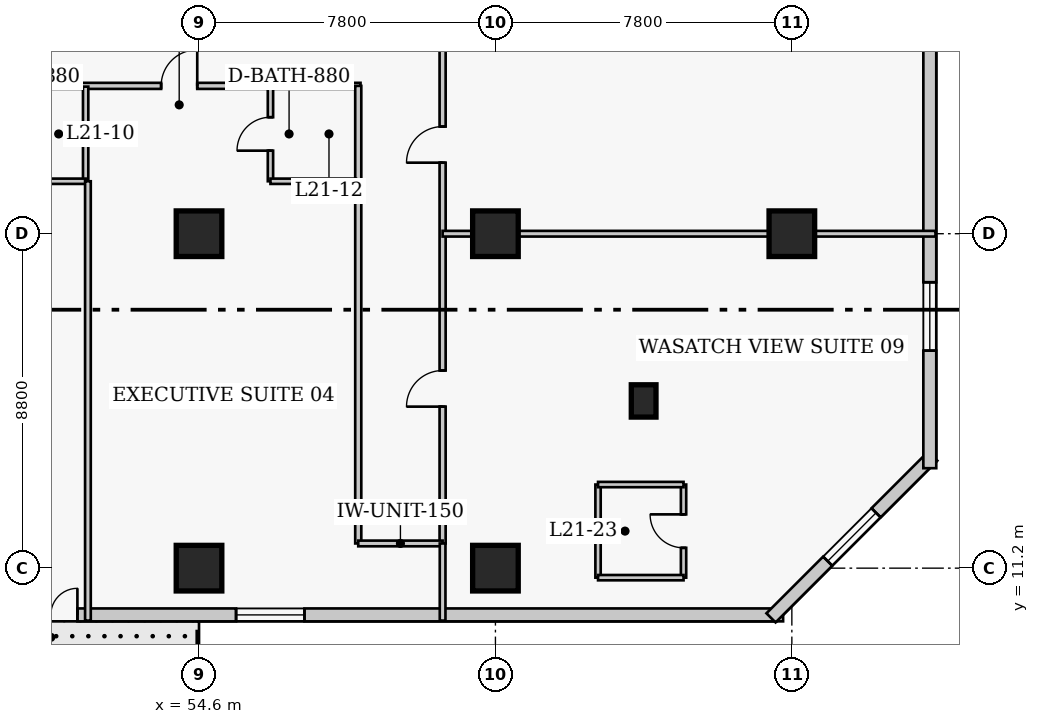
"""IFC4 building model, lengths in metres.
Left out: names, types, materials, properties, quantities, classifications, styles, units other than length and angle.
Written with IfcOpenShell. Run it as: python <this file> out.ifc"""

import sys

from ifc_helpers import new_model, si_unit, direction, frame, frame_2d, origin, origin_2d, place, context, subcontext, project, spatial, rectangle, extrude, element, fill, save


model = new_model("IFC4")
c1 = context("Model", 3, precision=1e-05, world=origin(), true_north=direction((0.0, 1.0)))
c2 = subcontext(c1, "Body", "Model", "MODEL_VIEW")
j1 = project(units=[si_unit("LENGTHUNIT", "METRE"), si_unit("PLANEANGLEUNIT", "RADIAN")], contexts=[c1])
p1 = place(None, origin())
s1 = spatial("IfcSite", under=j1, at=p1, CompositionType="ELEMENT")
p2 = place(p1, origin())
s2 = spatial("IfcBuilding", under=s1, at=p2, CompositionType="ELEMENT")
p3 = place(p2, frame((0.0, 0.0, 88.0)))
s3 = spatial("IfcBuildingStorey", under=s2, at=p3, CompositionType="ELEMENT", Elevation=88.0)
for number, where, z_axis, x_axis in (
    (1, (54.6, 11.2, 0.0), (0.0, 0.0, 1.0), (1.0, 0.0, 0.0)),
    (2, (54.6, 20.0, 0.0), (0.0, 0.0, 1.0), (1.0, 0.0, 0.0)),
    (3, (62.4, 11.2, 0.0), (0.0, 0.0, 1.0), (1.0, 0.0, 0.0)),
    (4, (62.4, 20.0, 0.0), (0.0, 0.0, 1.0), (1.0, 0.0, 0.0)),
    (5, (70.2, 20.0, 0.0), (0.0, 0.0, 1.0), (1.0, 0.0, 0.0)),
):
    element("IfcColumn", number, at=place(p3, frame(where, z_axis=z_axis, x_axis=x_axis)), inside=s3, PredefinedType="COLUMN", context=c2, shape_type="SweptSolid", body=[
        extrude(rectangle(XDim=1.2, YDim=1.2, at=origin_2d()), origin(), (0.0, 0.0, 1.0), 3.8),
    ])
p4 = place(p3, frame((66.3, 15.6, 0.0), z_axis=(0.0, 0.0, 1.0), x_axis=(1.0, 0.0, 0.0)))
e6 = element("IfcColumn", 6, at=p4, inside=s3, PredefinedType="PILASTER", context=c2, shape_type="SweptSolid", body=[
    extrude(rectangle(XDim=0.65, YDim=0.85, at=origin_2d()), origin(), (0.0, 0.0, 1.0), 3.8),
])
p5 = place(p3, frame((41.68, 9.97, 0.0), z_axis=(0.0, 0.0, 1.0), x_axis=(1.0, 0.0, 0.0)))
e7 = element("IfcWall", 7, at=p5, inside=s3, PredefinedType="SOLIDWALL", context=c2, shape_type="SweptSolid", body=[
    extrude(rectangle(XDim=28.29, YDim=0.34, at=frame_2d((14.145, 0.0))), origin(), (0.0, 0.0, 1.0), 3.54),
])
p6 = place(p5, frame((8.32, 0.0, 0.0)))
e8 = element("IfcOpeningElement", 8, at=p6, cuts=e7, PredefinedType="OPENING", context=c2, shape_type="SweptSolid", body=[
    extrude(rectangle(XDim=1.4, YDim=2.15, at=frame_2d((0.7, 1.075))), frame((0.0, 0.18, 0.0), z_axis=(0.0, -1.0, 0.0), x_axis=(1.0, 0.0, 0.0)), (0.0, 0.0, 1.0), 0.36),
])
p7 = place(p5, frame((2.665, 0.0, 0.85)))
e9 = element("IfcOpeningElement", 9, at=p7, cuts=e7, PredefinedType="OPENING", context=c2, shape_type="SweptSolid", body=[
    extrude(rectangle(XDim=1.8, YDim=1.8, at=frame_2d((0.9, 0.9))), frame((0.0, 0.18, 0.0), z_axis=(0.0, -1.0, 0.0), x_axis=(1.0, 0.0, 0.0)), (0.0, 0.0, 1.0), 0.36),
])
p8 = place(p5, frame((13.895, 0.0, 0.85)))
e10 = element("IfcOpeningElement", 10, at=p8, cuts=e7, PredefinedType="OPENING", context=c2, shape_type="SweptSolid", body=[
    extrude(rectangle(XDim=1.8, YDim=1.8, at=frame_2d((0.9, 0.9))), frame((0.0, 0.18, 0.0), z_axis=(0.0, -1.0, 0.0), x_axis=(1.0, 0.0, 0.0)), (0.0, 0.0, 1.0), 0.36),
])
p9 = place(p3, frame((69.652, 9.892, 0.0), z_axis=(0.0, 0.0, 1.0), x_axis=(0.707106781187, 0.707106781187, 0.0)))
e11 = element("IfcWall", 11, at=p9, inside=s3, PredefinedType="SOLIDWALL", context=c2, shape_type="SweptSolid", body=[
    extrude(rectangle(XDim=6.02, YDim=0.34, at=frame_2d((3.01, 0.0))), origin(), (0.0, 0.0, 1.0), 3.54),
])
p10 = place(p9, frame((2.11, 0.0, 0.85)))
e12 = element("IfcOpeningElement", 12, at=p10, cuts=e11, PredefinedType="OPENING", context=c2, shape_type="SweptSolid", body=[
    extrude(rectangle(XDim=1.8, YDim=1.8, at=frame_2d((0.9, 0.9))), frame((0.0, 0.18, 0.0), z_axis=(0.0, -1.0, 0.0), x_axis=(1.0, 0.0, 0.0)), (0.0, 0.0, 1.0), 0.36),
])
p11 = place(p3, frame((73.83, 13.83, 0.0), z_axis=(0.0, 0.0, 1.0), x_axis=(0.0, 1.0, 0.0)))
e13 = element("IfcWall", 13, at=p11, inside=s3, PredefinedType="SOLIDWALL", context=c2, shape_type="SweptSolid", body=[
    extrude(rectangle(XDim=31.94, YDim=0.34, at=frame_2d((15.97, 0.0))), origin(), (0.0, 0.0, 1.0), 3.54),
])
p12 = place(p11, frame((3.093, 0.0, 0.85)))
e14 = element("IfcOpeningElement", 14, at=p12, cuts=e13, PredefinedType="OPENING", context=c2, shape_type="SweptSolid", body=[
    extrude(rectangle(XDim=1.8, YDim=1.8, at=frame_2d((0.9, 0.9))), frame((0.0, 0.18, 0.0), z_axis=(0.0, -1.0, 0.0), x_axis=(1.0, 0.0, 0.0)), (0.0, 0.0, 1.0), 0.36),
])
p13 = place(p11, frame((11.077, 0.0, 0.85)))
e15 = element("IfcOpeningElement", 15, at=p13, cuts=e13, PredefinedType="OPENING", context=c2, shape_type="SweptSolid", body=[
    extrude(rectangle(XDim=1.8, YDim=1.8, at=frame_2d((0.9, 0.9))), frame((0.0, 0.18, 0.0), z_axis=(0.0, -1.0, 0.0), x_axis=(1.0, 0.0, 0.0)), (0.0, 0.0, 1.0), 0.36),
])
p14 = place(p11, frame((19.062, 0.0, 0.85)))
e16 = element("IfcOpeningElement", 16, at=p14, cuts=e13, PredefinedType="OPENING", context=c2, shape_type="SweptSolid", body=[
    extrude(rectangle(XDim=1.8, YDim=1.8, at=frame_2d((0.9, 0.9))), frame((0.0, 0.18, 0.0), z_axis=(0.0, -1.0, 0.0), x_axis=(1.0, 0.0, 0.0)), (0.0, 0.0, 1.0), 0.36),
])
p15 = place(p11, frame((27.048, 0.0, 0.85)))
e17 = element("IfcOpeningElement", 17, at=p15, cuts=e13, PredefinedType="OPENING", context=c2, shape_type="SweptSolid", body=[
    extrude(rectangle(XDim=1.8, YDim=1.8, at=frame_2d((0.9, 0.9))), frame((0.0, 0.18, 0.0), z_axis=(0.0, -1.0, 0.0), x_axis=(1.0, 0.0, 0.0)), (0.0, 0.0, 1.0), 0.36),
])
p16 = place(p3, frame((35.8, 23.89, 0.0), z_axis=(0.0, 0.0, 1.0), x_axis=(1.0, 0.0, 0.0)))
e18 = element("IfcWall", 18, at=p16, inside=s3, PredefinedType="PARTITIONING", context=c2, shape_type="SweptSolid", body=[
    extrude(rectangle(XDim=23.05, YDim=0.16, at=frame_2d((11.525, 0.0))), origin(), (0.0, 0.0, 1.0), 3.54),
])
p17 = place(p16, frame((3.607, 0.0, 0.0)))
e19 = element("IfcOpeningElement", 19, at=p17, cuts=e18, PredefinedType="OPENING", context=c2, shape_type="SweptSolid", body=[
    extrude(rectangle(XDim=1.0, YDim=2.15, at=frame_2d((0.5, 1.075))), frame((0.0, 0.09, 0.0), z_axis=(0.0, -1.0, 0.0), x_axis=(1.0, 0.0, 0.0)), (0.0, 0.0, 1.0), 0.18),
])
p18 = place(p16, frame((10.415, 0.0, 0.0)))
e20 = element("IfcOpeningElement", 20, at=p18, cuts=e18, PredefinedType="OPENING", context=c2, shape_type="SweptSolid", body=[
    extrude(rectangle(XDim=0.95, YDim=2.1, at=frame_2d((0.475, 1.05))), frame((0.0, 0.09, 0.0), z_axis=(0.0, -1.0, 0.0), x_axis=(1.0, 0.0, 0.0)), (0.0, 0.0, 1.0), 0.18),
])
p19 = place(p16, frame((17.803, 0.0, 0.0)))
e21 = element("IfcOpeningElement", 21, at=p19, cuts=e18, PredefinedType="OPENING", context=c2, shape_type="SweptSolid", body=[
    extrude(rectangle(XDim=0.95, YDim=2.1, at=frame_2d((0.475, 1.05))), frame((0.0, 0.09, 0.0), z_axis=(0.0, -1.0, 0.0), x_axis=(1.0, 0.0, 0.0)), (0.0, 0.0, 1.0), 0.18),
])
p20 = place(p3, frame((61.01, 11.85, 0.0), z_axis=(0.0, 0.0, 1.0), x_axis=(0.0, 1.0, 0.0)))
e22 = element("IfcWall", 22, at=p20, inside=s3, PredefinedType="PARTITIONING", context=c2, shape_type="SweptSolid", body=[
    extrude(rectangle(XDim=28.8, YDim=0.16, at=frame_2d((14.4, 0.0))), origin(), (0.0, 0.0, 1.0), 3.54),
])
p21 = place(p20, frame((3.6, 0.0, 0.0)))
e23 = element("IfcOpeningElement", 23, at=p21, cuts=e22, PredefinedType="OPENING", context=c2, shape_type="SweptSolid", body=[
    extrude(rectangle(XDim=0.95, YDim=2.1, at=frame_2d((0.475, 1.05))), frame((0.0, 0.09, 0.0), z_axis=(0.0, -1.0, 0.0), x_axis=(1.0, 0.0, 0.0)), (0.0, 0.0, 1.0), 0.18),
])
p22 = place(p20, frame((10.019, 0.0, 0.0)))
e24 = element("IfcOpeningElement", 24, at=p22, cuts=e22, PredefinedType="OPENING", context=c2, shape_type="SweptSolid", body=[
    extrude(rectangle(XDim=0.95, YDim=2.1, at=frame_2d((0.475, 1.05))), frame((0.0, 0.09, 0.0), z_axis=(0.0, -1.0, 0.0), x_axis=(1.0, 0.0, 0.0)), (0.0, 0.0, 1.0), 0.18),
])
p23 = place(p20, frame((27.36, 0.0, 0.0)))
e25 = element("IfcOpeningElement", 25, at=p23, cuts=e22, PredefinedType="OPENING", context=c2, shape_type="SweptSolid", body=[
    extrude(rectangle(XDim=1.0, YDim=2.15, at=frame_2d((0.5, 1.075))), frame((0.0, 0.09, 0.0), z_axis=(0.0, -1.0, 0.0), x_axis=(1.0, 0.0, 0.0)), (0.0, 0.0, 1.0), 0.18),
])
p24 = place(p3, frame((58.79, 11.85, 0.0), z_axis=(0.0, 0.0, 1.0), x_axis=(0.0, 1.0, 0.0)))
e26 = element("IfcWall", 26, at=p24, inside=s3, PredefinedType="PARTITIONING", context=c2, shape_type="SweptSolid", body=[
    extrude(rectangle(XDim=12.04, YDim=0.16, at=frame_2d((6.02, 0.0))), origin(), (0.0, 0.0, 1.0), 3.54),
])
p25 = place(p3, frame((58.79, 11.85, 0.0), z_axis=(0.0, 0.0, 1.0), x_axis=(1.0, 0.0, 0.0)))
e27 = element("IfcWall", 27, at=p25, inside=s3, PredefinedType="PARTITIONING", context=c2, shape_type="SweptSolid", body=[
    extrude(rectangle(XDim=2.22, YDim=0.15, at=frame_2d((1.11, 0.0))), origin(), (0.0, 0.0, 1.0), 3.54),
])
p26 = place(p3, frame((51.617, 21.38, 0.0), z_axis=(0.0, 0.0, 1.0), x_axis=(0.0, 1.0, 0.0)))
e28 = element("IfcWall", 28, at=p26, inside=s3, PredefinedType="PLUMBINGWALL", context=c2, shape_type="SweptSolid", body=[
    extrude(rectangle(XDim=2.49, YDim=0.14, at=frame_2d((1.245, 0.0))), origin(), (0.0, 0.0, 1.0), 3.54),
])
p27 = place(p3, frame((49.367, 21.38, 0.0), z_axis=(0.0, 0.0, 1.0), x_axis=(1.0, 0.0, 0.0)))
e29 = element("IfcWall", 29, at=p27, inside=s3, PredefinedType="PLUMBINGWALL", context=c2, shape_type="SweptSolid", body=[
    extrude(rectangle(XDim=2.25, YDim=0.14, at=frame_2d((1.125, 0.0))), origin(), (0.0, 0.0, 1.0), 3.54),
])
p28 = place(p3, frame((51.677, 9.82, 0.0), z_axis=(0.0, 0.0, 1.0), x_axis=(0.0, 1.0, 0.0)))
e30 = element("IfcWall", 30, at=p28, inside=s3, PredefinedType="PARTITIONING", context=c2, shape_type="SweptSolid", body=[
    extrude(rectangle(XDim=11.56, YDim=0.15, at=frame_2d((5.78, 0.0))), origin(), (0.0, 0.0, 1.0), 3.54),
])
p29 = place(p3, frame((56.48, 21.38, 0.0), z_axis=(0.0, 0.0, 1.0), x_axis=(0.0, 1.0, 0.0)))
e31 = element("IfcWall", 31, at=p29, inside=s3, PredefinedType="PLUMBINGWALL", context=c2, shape_type="SweptSolid", body=[
    extrude(rectangle(XDim=2.49, YDim=0.14, at=frame_2d((1.245, 0.0))), origin(), (0.0, 0.0, 1.0), 3.54),
])
p30 = place(p29, frame((0.805, 0.0, 0.0)))
e32 = element("IfcOpeningElement", 32, at=p30, cuts=e31, PredefinedType="OPENING", context=c2, shape_type="SweptSolid", body=[
    extrude(rectangle(XDim=0.88, YDim=2.05, at=frame_2d((0.44, 1.025))), frame((0.0, 0.08, 0.0), z_axis=(0.0, -1.0, 0.0), x_axis=(1.0, 0.0, 0.0)), (0.0, 0.0, 1.0), 0.16),
])
p31 = place(p3, frame((56.48, 21.38, 0.0), z_axis=(0.0, 0.0, 1.0), x_axis=(1.0, 0.0, 0.0)))
e33 = element("IfcWall", 33, at=p31, inside=s3, PredefinedType="PLUMBINGWALL", context=c2, shape_type="SweptSolid", body=[
    extrude(rectangle(XDim=2.25, YDim=0.14, at=frame_2d((1.125, 0.0))), origin(), (0.0, 0.0, 1.0), 3.54),
])
p32 = place(p3, frame((61.01, 9.82, 0.0), z_axis=(0.0, 0.0, 1.0), x_axis=(0.0, 1.0, 0.0)))
e34 = element("IfcWall", 34, at=p32, inside=s3, PredefinedType="PARTITIONING", context=c2, shape_type="SweptSolid", body=[
    extrude(rectangle(XDim=2.03, YDim=0.15, at=frame_2d((1.015, 0.0))), origin(), (0.0, 0.0, 1.0), 3.54),
])
p33 = place(p3, frame((65.1, 10.95, 0.0), z_axis=(0.0, 0.0, 1.0), x_axis=(0.0, 1.0, 0.0)))
e35 = element("IfcWall", 35, at=p33, inside=s3, PredefinedType="PLUMBINGWALL", context=c2, shape_type="SweptSolid", body=[
    extrude(rectangle(XDim=2.45, YDim=0.14, at=frame_2d((1.225, 0.0))), origin(), (0.0, 0.0, 1.0), 3.54),
])
p34 = place(p3, frame((67.35, 10.95, 0.0), z_axis=(0.0, 0.0, 1.0), x_axis=(0.0, 1.0, 0.0)))
e36 = element("IfcWall", 36, at=p34, inside=s3, PredefinedType="PLUMBINGWALL", context=c2, shape_type="SweptSolid", body=[
    extrude(rectangle(XDim=2.45, YDim=0.14, at=frame_2d((1.225, 0.0))), origin(), (0.0, 0.0, 1.0), 3.54),
])
p35 = place(p34, frame((0.785, 0.0, 0.0)))
e37 = element("IfcOpeningElement", 37, at=p35, cuts=e36, PredefinedType="OPENING", context=c2, shape_type="SweptSolid", body=[
    extrude(rectangle(XDim=0.88, YDim=2.05, at=frame_2d((0.44, 1.025))), frame((0.0, 0.08, 0.0), z_axis=(0.0, -1.0, 0.0), x_axis=(1.0, 0.0, 0.0)), (0.0, 0.0, 1.0), 0.16),
])
for number, where, z_axis, x_axis in (
    (38, (65.1, 10.95, 0.0), (0.0, 0.0, 1.0), (1.0, 0.0, 0.0)),
    (39, (65.1, 13.4, 0.0), (0.0, 0.0, 1.0), (1.0, 0.0, 0.0)),
):
    element("IfcWall", number, at=place(p3, frame(where, z_axis=z_axis, x_axis=x_axis)), inside=s3, PredefinedType="PLUMBINGWALL", context=c2, shape_type="SweptSolid", body=[
        extrude(rectangle(XDim=2.25, YDim=0.14, at=frame_2d((1.125, 0.0))), origin(), (0.0, 0.0, 1.0), 3.54),
    ])
p36 = place(p3, frame((61.01, 20.0, 0.0), z_axis=(0.0, 0.0, 1.0), x_axis=(1.0, 0.0, 0.0)))
e40 = element("IfcWall", 40, at=p36, inside=s3, PredefinedType="PARTITIONING", context=c2, shape_type="SweptSolid", body=[
    extrude(rectangle(XDim=12.97, YDim=0.15, at=frame_2d((6.485, 0.0))), origin(), (0.0, 0.0, 1.0), 2.679),
])
p37 = place(p6, origin())
e41 = element("IfcDoor", 41, at=p37, inside=s3, OperationType="DOUBLE_DOOR_SINGLE_SWING", PredefinedType="DOOR", context=c2, shape_type="SweptSolid", body=[
    extrude(rectangle(XDim=1.4, YDim=2.15, at=frame_2d((0.7, 1.075))), frame((0.0, 0.025, 0.0), z_axis=(0.0, -1.0, 0.0), x_axis=(1.0, 0.0, 0.0)), (0.0, 0.0, 1.0), 0.05),
])
fill(e8, e41)
p38 = place(p8, origin())
e42 = element("IfcWindow", 42, at=p38, inside=s3, PartitioningType="SINGLE_PANEL", PredefinedType="WINDOW", context=c2, shape_type="SweptSolid", body=[
    extrude(rectangle(XDim=1.8, YDim=1.8, at=frame_2d((0.9, 0.9))), frame((0.0, 0.03, 0.0), z_axis=(0.0, -1.0, 0.0), x_axis=(1.0, 0.0, 0.0)), (0.0, 0.0, 1.0), 0.06),
])
fill(e10, e42)
p39 = place(p10, origin())
e43 = element("IfcWindow", 43, at=p39, inside=s3, PartitioningType="SINGLE_PANEL", PredefinedType="WINDOW", context=c2, shape_type="SweptSolid", body=[
    extrude(rectangle(XDim=1.8, YDim=1.8, at=frame_2d((0.9, 0.9))), frame((0.0, 0.03, 0.0), z_axis=(0.0, -1.0, 0.0), x_axis=(1.0, 0.0, 0.0)), (0.0, 0.0, 1.0), 0.06),
])
fill(e12, e43)
p40 = place(p12, origin())
e44 = element("IfcWindow", 44, at=p40, inside=s3, PartitioningType="SINGLE_PANEL", PredefinedType="WINDOW", context=c2, shape_type="SweptSolid", body=[
    extrude(rectangle(XDim=1.8, YDim=1.8, at=frame_2d((0.9, 0.9))), frame((0.0, 0.03, 0.0), z_axis=(0.0, -1.0, 0.0), x_axis=(1.0, 0.0, 0.0)), (0.0, 0.0, 1.0), 0.06),
])
fill(e14, e44)
p41 = place(p30, origin())
e45 = element("IfcDoor", 45, at=p41, inside=s3, OperationType="SINGLE_SWING_LEFT", PredefinedType="DOOR", context=c2, shape_type="SweptSolid", body=[
    extrude(rectangle(XDim=0.88, YDim=2.05, at=frame_2d((0.44, 1.025))), frame((0.0, 0.025, 0.0), z_axis=(0.0, -1.0, 0.0), x_axis=(1.0, 0.0, 0.0)), (0.0, 0.0, 1.0), 0.05),
])
fill(e32, e45)
p42 = place(p19, origin())
e46 = element("IfcDoor", 46, at=p42, inside=s3, OperationType="SINGLE_SWING_RIGHT", PredefinedType="DOOR", context=c2, shape_type="SweptSolid", body=[
    extrude(rectangle(XDim=0.95, YDim=2.1, at=frame_2d((0.475, 1.05))), frame((0.0, 0.025, 0.0), z_axis=(0.0, -1.0, 0.0), x_axis=(1.0, 0.0, 0.0)), (0.0, 0.0, 1.0), 0.05),
])
fill(e21, e46)
p43 = place(p35, origin())
e47 = element("IfcDoor", 47, at=p43, inside=s3, OperationType="SINGLE_SWING_RIGHT", PredefinedType="DOOR", context=c2, shape_type="SweptSolid", body=[
    extrude(rectangle(XDim=0.88, YDim=2.05, at=frame_2d((0.44, 1.025))), frame((0.0, 0.025, 0.0), z_axis=(0.0, -1.0, 0.0), x_axis=(1.0, 0.0, 0.0)), (0.0, 0.0, 1.0), 0.05),
])
fill(e37, e47)
p44 = place(p21, origin())
e48 = element("IfcDoor", 48, at=p44, inside=s3, OperationType="SINGLE_SWING_LEFT", PredefinedType="DOOR", context=c2, shape_type="SweptSolid", body=[
    extrude(rectangle(XDim=0.95, YDim=2.1, at=frame_2d((0.475, 1.05))), frame((0.0, 0.025, 0.0), z_axis=(0.0, -1.0, 0.0), x_axis=(1.0, 0.0, 0.0)), (0.0, 0.0, 1.0), 0.05),
])
fill(e23, e48)
p45 = place(p22, origin())
e49 = element("IfcDoor", 49, at=p45, inside=s3, OperationType="SINGLE_SWING_LEFT", PredefinedType="DOOR", context=c2, shape_type="SweptSolid", body=[
    extrude(rectangle(XDim=0.95, YDim=2.1, at=frame_2d((0.475, 1.05))), frame((0.0, 0.025, 0.0), z_axis=(0.0, -1.0, 0.0), x_axis=(1.0, 0.0, 0.0)), (0.0, 0.0, 1.0), 0.05),
])
fill(e24, e49)
save(model, sys.argv[1])
